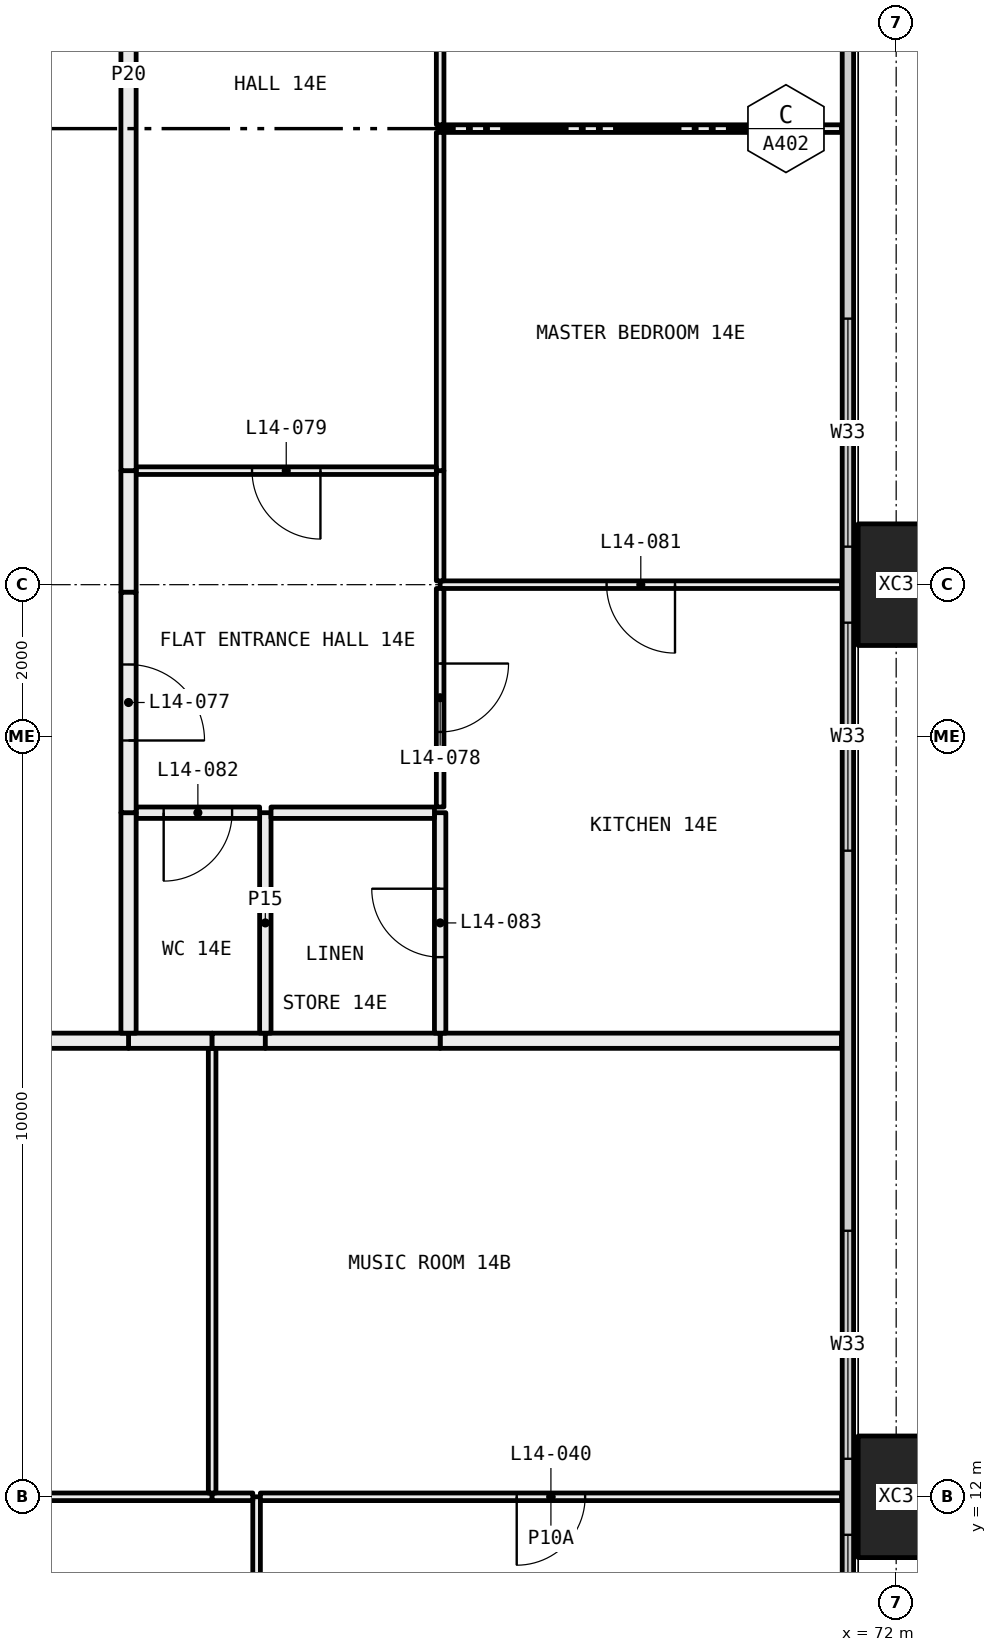
"""IFC4 building model, lengths in metres.
Left out: names, types, materials, properties, quantities, classifications, styles, units other than length and angle.
Written with IfcOpenShell. Run it as: python <this file> out.ifc"""

import sys

from ifc_helpers import new_model, si_unit, direction, frame, frame_2d, origin, origin_2d, place, context, subcontext, project, spatial, rectangle, hollow_rectangle, extrude, element, fill, save


model = new_model("IFC4")
c1 = context("Model", 3, precision=1e-05, world=origin(), true_north=direction((0.0, 1.0)))
c2 = subcontext(c1, "Body", "Model", "MODEL_VIEW")
j1 = project(units=[si_unit("LENGTHUNIT", "METRE"), si_unit("PLANEANGLEUNIT", "RADIAN")], contexts=[c1])
p1 = place(None, origin())
s1 = spatial("IfcSite", under=j1, at=p1, CompositionType="ELEMENT")
p2 = place(p1, origin())
s2 = spatial("IfcBuilding", under=s1, at=p2, CompositionType="ELEMENT")
p3 = place(p2, frame((0.0, 0.0, 61.05)))
s3 = spatial("IfcBuildingStorey", under=s2, at=p3, CompositionType="ELEMENT", Elevation=61.05)
for number, where, z_axis, x_axis in (
    (1, (72.0, 12.0, -0.4), (0.0, 0.0, 1.0), (0.0, 1.0, 0.0)),
    (2, (72.0, 24.0, -0.4), (0.0, 0.0, 1.0), (0.0, 1.0, 0.0)),
):
    element("IfcColumn", number, at=place(p3, frame(where, z_axis=z_axis, x_axis=x_axis)), inside=s3, PredefinedType="COLUMN", context=c2, shape_type="SweptSolid", body=[
        extrude(hollow_rectangle(XDim=1.6, YDim=1.0, WallThickness=0.065, at=origin_2d()), origin(), (0.0, 0.0, 1.0), 3.45),
    ])
p4 = place(p3, frame((71.365, 6.71, 0.0), z_axis=(0.0, 0.0, 1.0), x_axis=(0.0, 1.0, 0.0)))
e3 = element("IfcWall", 3, at=p4, inside=s3, PredefinedType="ELEMENTEDWALL", context=c2, shape_type="SweptSolid", body=[
    extrude(rectangle(XDim=34.58, YDim=0.15, at=frame_2d((17.29, 0.0))), origin(), (0.0, 0.0, 1.0), 3.05),
])
p5 = place(p4, frame((0.29, 0.0, 0.45)))
e4 = element("IfcOpeningElement", 4, at=p5, cuts=e3, PredefinedType="OPENING", context=c2, shape_type="SweptSolid", body=[
    extrude(rectangle(XDim=4.5, YDim=2.55, at=frame_2d((2.25, 1.275))), frame((0.0, 0.085, 0.0), z_axis=(0.0, -1.0, 0.0), x_axis=(1.0, 0.0, 0.0)), (0.0, 0.0, 1.0), 0.17),
])
p6 = place(p4, frame((5.79, 0.0, 0.45)))
e5 = element("IfcOpeningElement", 5, at=p6, cuts=e3, PredefinedType="OPENING", context=c2, shape_type="SweptSolid", body=[
    extrude(rectangle(XDim=3.0, YDim=2.55, at=frame_2d((1.5, 1.275))), frame((0.0, 0.085, 0.0), z_axis=(0.0, -1.0, 0.0), x_axis=(1.0, 0.0, 0.0)), (0.0, 0.0, 1.0), 0.17),
])
p7 = place(p4, frame((13.79, 0.0, 0.45)))
e6 = element("IfcOpeningElement", 6, at=p7, cuts=e3, PredefinedType="OPENING", context=c2, shape_type="SweptSolid", body=[
    extrude(rectangle(XDim=3.0, YDim=2.55, at=frame_2d((1.5, 1.275))), frame((0.0, 0.085, 0.0), z_axis=(0.0, -1.0, 0.0), x_axis=(1.0, 0.0, 0.0)), (0.0, 0.0, 1.0), 0.17),
])
p8 = place(p4, frame((17.79, 0.0, 0.45)))
e7 = element("IfcOpeningElement", 7, at=p8, cuts=e3, PredefinedType="OPENING", context=c2, shape_type="SweptSolid", body=[
    extrude(rectangle(XDim=3.0, YDim=2.55, at=frame_2d((1.5, 1.275))), frame((0.0, 0.085, 0.0), z_axis=(0.0, -1.0, 0.0), x_axis=(1.0, 0.0, 0.0)), (0.0, 0.0, 1.0), 0.17),
])
p9 = place(p4, frame((26.79, 0.0, 0.45)))
e8 = element("IfcOpeningElement", 8, at=p9, cuts=e3, PredefinedType="OPENING", context=c2, shape_type="SweptSolid", body=[
    extrude(rectangle(XDim=2.0, YDim=2.55, at=frame_2d((1.0, 1.275))), frame((0.0, 0.085, 0.0), z_axis=(0.0, -1.0, 0.0), x_axis=(1.0, 0.0, 0.0)), (0.0, 0.0, 1.0), 0.17),
])
p10 = place(p4, frame((29.79, 0.0, 0.45)))
e9 = element("IfcOpeningElement", 9, at=p10, cuts=e3, PredefinedType="OPENING", context=c2, shape_type="SweptSolid", body=[
    extrude(rectangle(XDim=4.5, YDim=2.55, at=frame_2d((2.25, 1.275))), frame((0.0, 0.085, 0.0), z_axis=(0.0, -1.0, 0.0), x_axis=(1.0, 0.0, 0.0)), (0.0, 0.0, 1.0), 0.17),
])
p11 = place(p3, frame((63.585, 6.05, 0.0), z_axis=(0.0, 0.0, 1.0), x_axis=(0.0, 1.0, 0.0)))
e10 = element("IfcWall", 10, at=p11, inside=s3, PredefinedType="PARTITIONING", context=c2, shape_type="SweptSolid", body=[
    extrude(rectangle(XDim=5.95, YDim=0.1, at=frame_2d((2.975, 0.0))), origin(), (0.0, 0.0, 1.0), 2.45),
])
p12 = place(p11, frame((2.525, 0.0, 0.0)))
e11 = element("IfcOpeningElement", 11, at=p12, cuts=e10, PredefinedType="OPENING", context=c2, shape_type="SweptSolid", body=[
    extrude(rectangle(XDim=0.9, YDim=2.1, at=frame_2d((0.45, 1.05))), frame((0.0, 0.06, 0.0), z_axis=(0.0, -1.0, 0.0), x_axis=(1.0, 0.0, 0.0)), (0.0, 0.0, 1.0), 0.12),
])
p13 = place(p3, frame((63.0, 12.0, 0.0), z_axis=(0.0, 0.0, 1.0), x_axis=(-1.0, 0.0, 0.0)))
e12 = element("IfcWall", 12, at=p13, inside=s3, PredefinedType="PARTITIONING", context=c2, shape_type="SweptSolid", body=[
    extrude(rectangle(XDim=2.2, YDim=0.1, at=frame_2d((1.1, 0.0))), origin(), (0.0, 0.0, 1.0), 2.45),
])
p14 = place(p3, frame((63.535, 12.0, 0.0), z_axis=(0.0, 0.0, 1.0), x_axis=(-1.0, 0.0, 0.0)))
e13 = element("IfcWall", 13, at=p14, inside=s3, PredefinedType="PARTITIONING", context=c2, shape_type="SweptSolid", body=[
    extrude(rectangle(XDim=0.535, YDim=0.1, at=frame_2d((0.268, 0.0))), origin(), (0.0, 0.0, 1.0), 2.45),
])
p15 = place(p3, frame((71.28, 12.0, 0.0), z_axis=(0.0, 0.0, 1.0), x_axis=(-1.0, 0.0, 0.0)))
e14 = element("IfcWall", 14, at=p15, inside=s3, PredefinedType="PARTITIONING", context=c2, shape_type="SweptSolid", body=[
    extrude(rectangle(XDim=7.645, YDim=0.1, at=frame_2d((3.823, 0.0))), origin(), (0.0, 0.0, 1.0), 2.45),
])
p16 = place(p15, frame((3.373, 0.0, 0.0)))
e15 = element("IfcOpeningElement", 15, at=p16, cuts=e14, PredefinedType="OPENING", context=c2, shape_type="SweptSolid", body=[
    extrude(rectangle(XDim=0.9, YDim=2.1, at=frame_2d((0.45, 1.05))), frame((0.0, 0.06, 0.0), z_axis=(0.0, -1.0, 0.0), x_axis=(1.0, 0.0, 0.0)), (0.0, 0.0, 1.0), 0.12),
])
p17 = place(p3, frame((63.0, 12.05, 0.0), z_axis=(0.0, 0.0, 1.0), x_axis=(0.0, 1.0, 0.0)))
e16 = element("IfcWall", 16, at=p17, inside=s3, PredefinedType="PARTITIONING", context=c2, shape_type="SweptSolid", body=[
    extrude(rectangle(XDim=5.85, YDim=0.1, at=frame_2d((2.925, 0.0))), origin(), (0.0, 0.0, 1.0), 2.45),
])
p18 = place(p3, frame((63.0, 18.0, 0.0), z_axis=(0.0, 0.0, 1.0), x_axis=(-1.0, 0.0, 0.0)))
e17 = element("IfcWall", 17, at=p18, inside=s3, PredefinedType="PARTITIONING", context=c2, shape_type="SweptSolid", body=[
    extrude(rectangle(XDim=1.1, YDim=0.2, at=frame_2d((0.55, 0.0))), origin(), (0.0, 0.0, 1.0), 3.05),
])
p19 = place(p3, frame((61.9, 18.0, 0.0), z_axis=(0.0, 0.0, 1.0), x_axis=(-1.0, 0.0, 0.0)))
e18 = element("IfcWall", 18, at=p19, inside=s3, PredefinedType="PARTITIONING", context=c2, shape_type="SweptSolid", body=[
    extrude(rectangle(XDim=7.9, YDim=0.2, at=frame_2d((3.95, 0.0))), origin(), (0.0, 0.0, 1.0), 3.05),
])
p20 = place(p3, frame((71.28, 18.0, 0.0), z_axis=(0.0, 0.0, 1.0), x_axis=(-1.0, 0.0, 0.0)))
e19 = element("IfcWall", 19, at=p20, inside=s3, PredefinedType="PARTITIONING", context=c2, shape_type="SweptSolid", body=[
    extrude(rectangle(XDim=5.28, YDim=0.2, at=frame_2d((2.64, 0.0))), origin(), (0.0, 0.0, 1.0), 3.05),
])
p21 = place(p3, frame((63.7, 18.0, 0.0), z_axis=(0.0, 0.0, 1.0), x_axis=(-1.0, 0.0, 0.0)))
e20 = element("IfcWall", 20, at=p21, inside=s3, PredefinedType="PARTITIONING", context=c2, shape_type="SweptSolid", body=[
    extrude(rectangle(XDim=0.7, YDim=0.2, at=frame_2d((0.35, 0.0))), origin(), (0.0, 0.0, 1.0), 3.05),
])
p22 = place(p3, frame((66.0, 18.0, 0.0), z_axis=(0.0, 0.0, 1.0), x_axis=(-1.0, 0.0, 0.0)))
e21 = element("IfcWall", 21, at=p22, inside=s3, PredefinedType="PARTITIONING", context=c2, shape_type="SweptSolid", body=[
    extrude(rectangle(XDim=2.3, YDim=0.2, at=frame_2d((1.15, 0.0))), origin(), (0.0, 0.0, 1.0), 3.05),
])
p23 = place(p3, frame((71.28, 24.0, 0.0), z_axis=(0.0, 0.0, 1.0), x_axis=(-1.0, 0.0, 0.0)))
e22 = element("IfcWall", 22, at=p23, inside=s3, PredefinedType="PARTITIONING", context=c2, shape_type="SweptSolid", body=[
    extrude(rectangle(XDim=5.28, YDim=0.1, at=frame_2d((2.64, 0.0))), origin(), (0.0, 0.0, 1.0), 2.45),
])
p24 = place(p23, frame((2.19, 0.0, 0.0)))
e23 = element("IfcOpeningElement", 23, at=p24, cuts=e22, PredefinedType="OPENING", context=c2, shape_type="SweptSolid", body=[
    extrude(rectangle(XDim=0.9, YDim=2.1, at=frame_2d((0.45, 1.05))), frame((0.0, 0.06, 0.0), z_axis=(0.0, -1.0, 0.0), x_axis=(1.0, 0.0, 0.0)), (0.0, 0.0, 1.0), 0.12),
])
p25 = place(p3, frame((66.0, 21.0, 0.0), z_axis=(0.0, 0.0, 1.0), x_axis=(0.0, -1.0, 0.0)))
e24 = element("IfcWall", 24, at=p25, inside=s3, PredefinedType="PARTITIONING", context=c2, shape_type="SweptSolid", body=[
    extrude(rectangle(XDim=2.9, YDim=0.15, at=frame_2d((1.45, 0.0))), origin(), (0.0, 0.0, 1.0), 3.05),
])
p26 = place(p25, frame((1.0, 0.0, 0.0)))
e25 = element("IfcOpeningElement", 25, at=p26, cuts=e24, PredefinedType="OPENING", context=c2, shape_type="SweptSolid", body=[
    extrude(rectangle(XDim=0.9, YDim=2.1, at=frame_2d((0.45, 1.05))), frame((0.0, 0.085, 0.0), z_axis=(0.0, -1.0, 0.0), x_axis=(1.0, 0.0, 0.0)), (0.0, 0.0, 1.0), 0.17),
])
p27 = place(p3, frame((66.0, 23.95, 0.0), z_axis=(0.0, 0.0, 1.0), x_axis=(0.0, -1.0, 0.0)))
e26 = element("IfcWall", 26, at=p27, inside=s3, PredefinedType="PARTITIONING", context=c2, shape_type="SweptSolid", body=[
    extrude(rectangle(XDim=2.875, YDim=0.1, at=frame_2d((1.438, 0.0))), origin(), (0.0, 0.0, 1.0), 2.45),
])
p28 = place(p27, frame((0.988, 0.0, 0.0)))
e27 = element("IfcOpeningElement", 27, at=p28, cuts=e26, PredefinedType="OPENING", context=c2, shape_type="SweptSolid", body=[
    extrude(rectangle(XDim=0.9, YDim=2.1, at=frame_2d((0.45, 1.05))), frame((0.0, 0.06, 0.0), z_axis=(0.0, -1.0, 0.0), x_axis=(1.0, 0.0, 0.0)), (0.0, 0.0, 1.0), 0.12),
])
p29 = place(p3, frame((71.28, 30.0, 0.0), z_axis=(0.0, 0.0, 1.0), x_axis=(-1.0, 0.0, 0.0)))
e28 = element("IfcWall", 28, at=p29, inside=s3, PredefinedType="PARTITIONING", context=c2, shape_type="SweptSolid", body=[
    extrude(rectangle(XDim=5.28, YDim=0.1, at=frame_2d((2.64, 0.0))), origin(), (0.0, 0.0, 1.0), 3.05),
])
p30 = place(p3, frame((66.0, 25.5, 0.0), z_axis=(0.0, 0.0, 1.0), x_axis=(0.0, -1.0, 0.0)))
e29 = element("IfcWall", 29, at=p30, inside=s3, PredefinedType="PARTITIONING", context=c2, shape_type="SweptSolid", body=[
    extrude(rectangle(XDim=1.45, YDim=0.1, at=frame_2d((0.725, 0.0))), origin(), (0.0, 0.0, 1.0), 2.45),
])
p31 = place(p3, frame((66.0, 29.95, 0.0), z_axis=(0.0, 0.0, 1.0), x_axis=(0.0, -1.0, 0.0)))
e30 = element("IfcWall", 30, at=p31, inside=s3, PredefinedType="PARTITIONING", context=c2, shape_type="SweptSolid", body=[
    extrude(rectangle(XDim=4.45, YDim=0.1, at=frame_2d((2.225, 0.0))), origin(), (0.0, 0.0, 1.0), 3.05),
])
p32 = place(p3, frame((66.0, 35.9, 0.0), z_axis=(0.0, 0.0, 1.0), x_axis=(0.0, -1.0, 0.0)))
e31 = element("IfcWall", 31, at=p32, inside=s3, PredefinedType="PARTITIONING", context=c2, shape_type="SweptSolid", body=[
    extrude(rectangle(XDim=5.85, YDim=0.1, at=frame_2d((2.925, 0.0))), origin(), (0.0, 0.0, 1.0), 3.05),
])
p33 = place(p32, frame((2.475, 0.0, 0.0)))
e32 = element("IfcOpeningElement", 32, at=p33, cuts=e31, PredefinedType="OPENING", context=c2, shape_type="SweptSolid", body=[
    extrude(rectangle(XDim=0.9, YDim=2.1, at=frame_2d((0.45, 1.05))), frame((0.0, 0.06, 0.0), z_axis=(0.0, -1.0, 0.0), x_axis=(1.0, 0.0, 0.0)), (0.0, 0.0, 1.0), 0.12),
])
p34 = place(p3, frame((63.7, 18.1, 0.0), z_axis=(0.0, 0.0, 1.0), x_axis=(0.0, 1.0, 0.0)))
e33 = element("IfcWall", 33, at=p34, inside=s3, PredefinedType="PARTITIONING", context=c2, shape_type="SweptSolid", body=[
    extrude(rectangle(XDim=2.9, YDim=0.15, at=frame_2d((1.45, 0.0))), origin(), (0.0, 0.0, 1.0), 3.05),
])
p35 = place(p3, frame((63.625, 21.0, 0.0), z_axis=(0.0, 0.0, 1.0), x_axis=(-1.0, 0.0, 0.0)))
e34 = element("IfcWall", 34, at=p35, inside=s3, PredefinedType="PARTITIONING", context=c2, shape_type="SweptSolid", body=[
    extrude(rectangle(XDim=1.625, YDim=0.15, at=frame_2d((0.812, 0.0))), origin(), (0.0, 0.0, 1.0), 3.05),
])
p36 = place(p35, frame((0.363, 0.0, 0.0)))
e35 = element("IfcOpeningElement", 35, at=p36, cuts=e34, PredefinedType="OPENING", context=c2, shape_type="SweptSolid", body=[
    extrude(rectangle(XDim=0.9, YDim=2.1, at=frame_2d((0.45, 1.05))), frame((0.0, 0.085, 0.0), z_axis=(0.0, -1.0, 0.0), x_axis=(1.0, 0.0, 0.0)), (0.0, 0.0, 1.0), 0.17),
])
p37 = place(p3, frame((61.9, 21.0, 0.0), z_axis=(0.0, 0.0, 1.0), x_axis=(0.0, -1.0, 0.0)))
e36 = element("IfcWall", 36, at=p37, inside=s3, PredefinedType="PARTITIONING", context=c2, shape_type="SweptSolid", body=[
    extrude(rectangle(XDim=2.9, YDim=0.2, at=frame_2d((1.45, 0.0))), origin(), (0.0, 0.0, 1.0), 3.05),
])
p38 = place(p3, frame((65.925, 21.0, 0.0), z_axis=(0.0, 0.0, 1.0), x_axis=(-1.0, 0.0, 0.0)))
e37 = element("IfcWall", 37, at=p38, inside=s3, PredefinedType="PARTITIONING", context=c2, shape_type="SweptSolid", body=[
    extrude(rectangle(XDim=2.15, YDim=0.15, at=frame_2d((1.075, 0.0))), origin(), (0.0, 0.0, 1.0), 3.05),
])
p39 = place(p3, frame((65.95, 25.5, 0.0), z_axis=(0.0, 0.0, 1.0), x_axis=(-1.0, 0.0, 0.0)))
e38 = element("IfcWall", 38, at=p39, inside=s3, PredefinedType="PARTITIONING", context=c2, shape_type="SweptSolid", body=[
    extrude(rectangle(XDim=3.95, YDim=0.1, at=frame_2d((1.975, 0.0))), origin(), (0.0, 0.0, 1.0), 3.05),
])
p40 = place(p39, frame((1.525, 0.0, 0.0)))
e39 = element("IfcOpeningElement", 39, at=p40, cuts=e38, PredefinedType="OPENING", context=c2, shape_type="SweptSolid", body=[
    extrude(rectangle(XDim=0.9, YDim=2.1, at=frame_2d((0.45, 1.05))), frame((0.0, 0.06, 0.0), z_axis=(0.0, -1.0, 0.0), x_axis=(1.0, 0.0, 0.0)), (0.0, 0.0, 1.0), 0.12),
])
p41 = place(p3, frame((61.9, 25.5, 0.0), z_axis=(0.0, 0.0, 1.0), x_axis=(0.0, -1.0, 0.0)))
e40 = element("IfcWall", 40, at=p41, inside=s3, PredefinedType="PARTITIONING", context=c2, shape_type="SweptSolid", body=[
    extrude(rectangle(XDim=1.6, YDim=0.2, at=frame_2d((0.8, 0.0))), origin(), (0.0, 0.0, 1.0), 2.45),
])
p42 = place(p3, frame((61.9, 23.9, 0.0), z_axis=(0.0, 0.0, 1.0), x_axis=(0.0, -1.0, 0.0)))
e41 = element("IfcWall", 41, at=p42, inside=s3, PredefinedType="PARTITIONING", context=c2, shape_type="SweptSolid", body=[
    extrude(rectangle(XDim=2.9, YDim=0.2, at=frame_2d((1.45, 0.0))), origin(), (0.0, 0.0, 1.0), 3.05),
])
p43 = place(p42, frame((0.95, 0.0, 0.0)))
e42 = element("IfcOpeningElement", 42, at=p43, cuts=e41, PredefinedType="OPENING", context=c2, shape_type="SweptSolid", body=[
    extrude(rectangle(XDim=1.0, YDim=2.1, at=frame_2d((0.5, 1.05))), frame((0.0, 0.11, 0.0), z_axis=(0.0, -1.0, 0.0), x_axis=(1.0, 0.0, 0.0)), (0.0, 0.0, 1.0), 0.22),
])
p44 = place(p3, frame((61.9, 35.9, 0.0), z_axis=(0.0, 0.0, 1.0), x_axis=(0.0, -1.0, 0.0)))
e43 = element("IfcWall", 43, at=p44, inside=s3, PredefinedType="PARTITIONING", context=c2, shape_type="SweptSolid", body=[
    extrude(rectangle(XDim=10.4, YDim=0.2, at=frame_2d((5.2, 0.0))), origin(), (0.0, 0.0, 1.0), 3.05),
])
p45 = place(p5, origin())
e44 = element("IfcWindow", 44, at=p45, inside=s3, PartitioningType="SINGLE_PANEL", PredefinedType="WINDOW", context=c2, shape_type="SweptSolid", body=[
    extrude(rectangle(XDim=4.5, YDim=2.55, at=frame_2d((2.25, 1.275))), frame((0.0, 0.03, 0.0), z_axis=(0.0, -1.0, 0.0), x_axis=(1.0, 0.0, 0.0)), (0.0, 0.0, 1.0), 0.06),
])
fill(e4, e44)
p46 = place(p6, origin())
e45 = element("IfcWindow", 45, at=p46, inside=s3, PartitioningType="SINGLE_PANEL", PredefinedType="WINDOW", context=c2, shape_type="SweptSolid", body=[
    extrude(rectangle(XDim=3.0, YDim=2.55, at=frame_2d((1.5, 1.275))), frame((0.0, 0.03, 0.0), z_axis=(0.0, -1.0, 0.0), x_axis=(1.0, 0.0, 0.0)), (0.0, 0.0, 1.0), 0.06),
])
fill(e5, e45)
p47 = place(p7, origin())
e46 = element("IfcWindow", 46, at=p47, inside=s3, PartitioningType="SINGLE_PANEL", PredefinedType="WINDOW", context=c2, shape_type="SweptSolid", body=[
    extrude(rectangle(XDim=3.0, YDim=2.55, at=frame_2d((1.5, 1.275))), frame((0.0, 0.03, 0.0), z_axis=(0.0, -1.0, 0.0), x_axis=(1.0, 0.0, 0.0)), (0.0, 0.0, 1.0), 0.06),
])
fill(e6, e46)
p48 = place(p8, origin())
e47 = element("IfcWindow", 47, at=p48, inside=s3, PartitioningType="SINGLE_PANEL", PredefinedType="WINDOW", context=c2, shape_type="SweptSolid", body=[
    extrude(rectangle(XDim=3.0, YDim=2.55, at=frame_2d((1.5, 1.275))), frame((0.0, 0.03, 0.0), z_axis=(0.0, -1.0, 0.0), x_axis=(1.0, 0.0, 0.0)), (0.0, 0.0, 1.0), 0.06),
])
fill(e7, e47)
p49 = place(p16, origin())
e48 = element("IfcDoor", 48, at=p49, inside=s3, OperationType="SINGLE_SWING_LEFT", PredefinedType="DOOR", context=c2, shape_type="SweptSolid", body=[
    extrude(rectangle(XDim=0.9, YDim=2.1, at=frame_2d((0.45, 1.05))), frame((0.0, 0.025, 0.0), z_axis=(0.0, -1.0, 0.0), x_axis=(1.0, 0.0, 0.0)), (0.0, 0.0, 1.0), 0.05),
])
fill(e15, e48)
p50 = place(p43, origin())
e49 = element("IfcDoor", 49, at=p50, inside=s3, OperationType="SINGLE_SWING_LEFT", PredefinedType="DOOR", context=c2, shape_type="SweptSolid", body=[
    extrude(rectangle(XDim=1.0, YDim=2.1, at=frame_2d((0.5, 1.05))), frame((0.0, 0.025, 0.0), z_axis=(0.0, -1.0, 0.0), x_axis=(1.0, 0.0, 0.0)), (0.0, 0.0, 1.0), 0.05),
])
fill(e42, e49)
p51 = place(p28, origin())
e50 = element("IfcDoor", 50, at=p51, inside=s3, OperationType="SINGLE_SWING_RIGHT", PredefinedType="DOOR", context=c2, shape_type="SweptSolid", body=[
    extrude(rectangle(XDim=0.9, YDim=2.1, at=frame_2d((0.45, 1.05))), frame((0.0, 0.025, 0.0), z_axis=(0.0, -1.0, 0.0), x_axis=(1.0, 0.0, 0.0)), (0.0, 0.0, 1.0), 0.05),
])
fill(e27, e50)
p52 = place(p40, origin())
e51 = element("IfcDoor", 51, at=p52, inside=s3, OperationType="SINGLE_SWING_RIGHT", PredefinedType="DOOR", context=c2, shape_type="SweptSolid", body=[
    extrude(rectangle(XDim=0.9, YDim=2.1, at=frame_2d((0.45, 1.05))), frame((0.0, 0.025, 0.0), z_axis=(0.0, -1.0, 0.0), x_axis=(1.0, 0.0, 0.0)), (0.0, 0.0, 1.0), 0.05),
])
fill(e39, e51)
p53 = place(p24, origin())
e52 = element("IfcDoor", 52, at=p53, inside=s3, OperationType="SINGLE_SWING_RIGHT", PredefinedType="DOOR", context=c2, shape_type="SweptSolid", body=[
    extrude(rectangle(XDim=0.9, YDim=2.1, at=frame_2d((0.45, 1.05))), frame((0.0, 0.025, 0.0), z_axis=(0.0, -1.0, 0.0), x_axis=(1.0, 0.0, 0.0)), (0.0, 0.0, 1.0), 0.05),
])
fill(e23, e52)
p54 = place(p36, origin())
e53 = element("IfcDoor", 53, at=p54, inside=s3, OperationType="SINGLE_SWING_LEFT", PredefinedType="DOOR", context=c2, shape_type="SweptSolid", body=[
    extrude(rectangle(XDim=0.9, YDim=2.1, at=frame_2d((0.45, 1.05))), frame((0.0, 0.025, 0.0), z_axis=(0.0, -1.0, 0.0), x_axis=(1.0, 0.0, 0.0)), (0.0, 0.0, 1.0), 0.05),
])
fill(e35, e53)
p55 = place(p26, frame((0.9, 0.0, 0.0), x_axis=(-1.0, 0.0, 0.0)))
e54 = element("IfcDoor", 54, at=p55, inside=s3, OperationType="SINGLE_SWING_LEFT", PredefinedType="DOOR", context=c2, shape_type="SweptSolid", body=[
    extrude(rectangle(XDim=0.9, YDim=2.1, at=frame_2d((0.45, 1.05))), frame((0.0, 0.025, 0.0), z_axis=(0.0, -1.0, 0.0), x_axis=(1.0, 0.0, 0.0)), (0.0, 0.0, 1.0), 0.05),
])
fill(e25, e54)
save(model, sys.argv[1])
